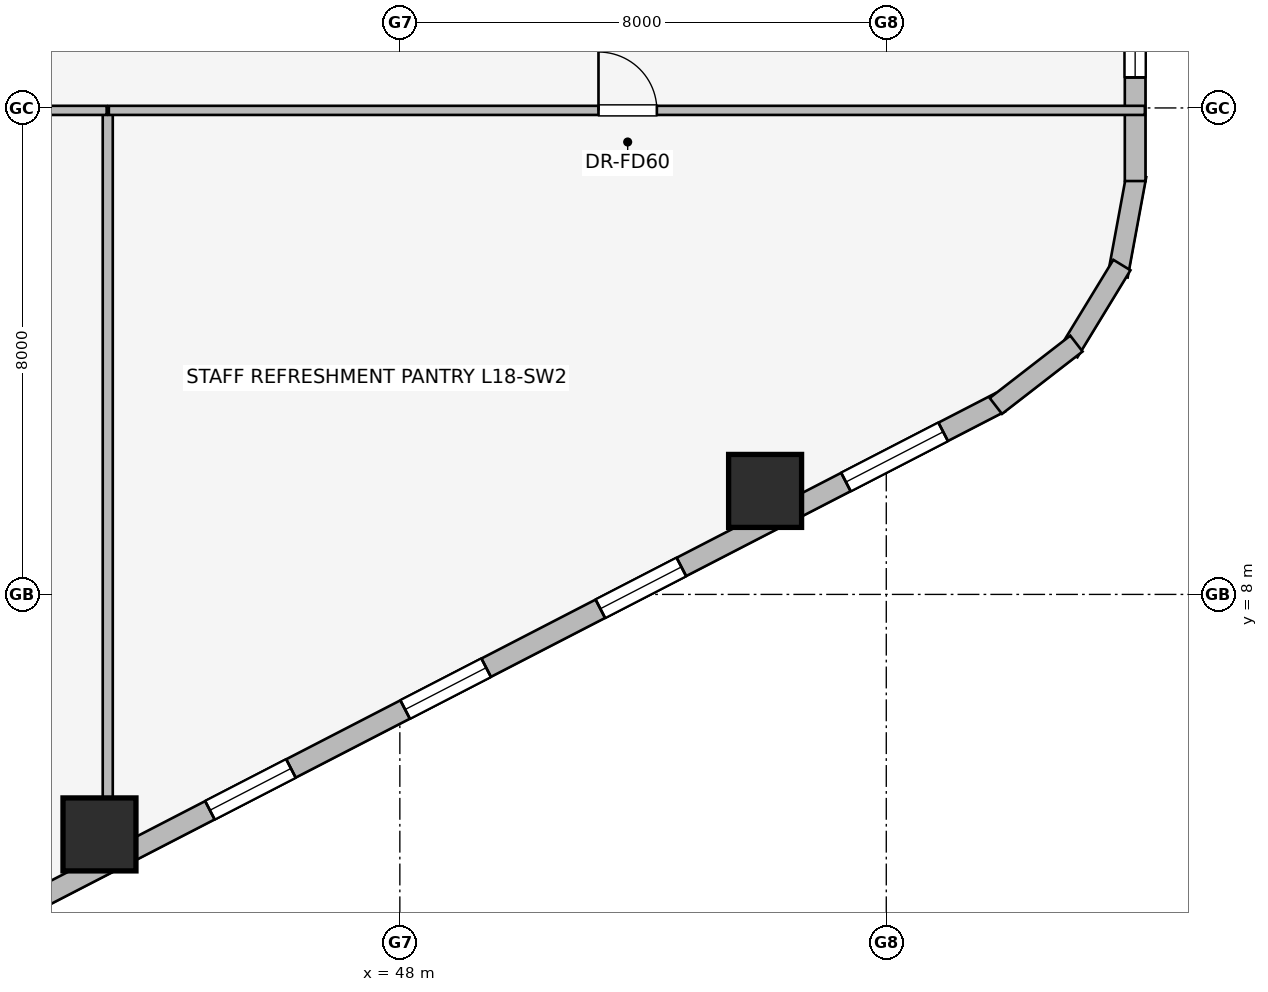
"""IFC4 building model, lengths in metres.
Left out: names, types, materials, properties, quantities, classifications, styles, units other than length and angle.
Written with IfcOpenShell. Run it as: python <this file> out.ifc"""

import sys

from ifc_helpers import new_model, si_unit, direction, frame, frame_2d, origin, origin_2d, place, context, subcontext, project, spatial, rectangle, extrude, element, fill, save


model = new_model("IFC4")
c1 = context("Model", 3, precision=1e-05, world=origin(), true_north=direction((0.0, 1.0)))
c2 = subcontext(c1, "Body", "Model", "MODEL_VIEW")
j1 = project(units=[si_unit("LENGTHUNIT", "METRE"), si_unit("PLANEANGLEUNIT", "RADIAN")], contexts=[c1])
p1 = place(None, origin())
s1 = spatial("IfcSite", under=j1, at=p1, CompositionType="ELEMENT")
p2 = place(p1, origin())
s2 = spatial("IfcBuilding", under=s1, at=p2, CompositionType="ELEMENT")
p3 = place(p2, frame((0.0, 0.0, 70.8)))
s3 = spatial("IfcBuildingStorey", under=s2, at=p3, CompositionType="ELEMENT", Elevation=70.8)
for number, where, z_axis, x_axis in (
    (1, (43.06, 4.053, 0.0), (0.0, 0.0, 1.0), (1.0, 0.0, 0.0)),
    (2, (54.007, 9.702, 0.0), (0.0, 0.0, 1.0), (1.0, 0.0, 0.0)),
):
    element("IfcColumn", number, at=place(p3, frame(where, z_axis=z_axis, x_axis=x_axis)), inside=s3, PredefinedType="COLUMN", context=c2, shape_type="SweptSolid", body=[
        extrude(rectangle(XDim=1.2, YDim=1.2, at=origin_2d()), origin(), (0.0, 0.0, 1.0), 3.65),
    ])
p4 = place(p3, frame((57.876, 11.159, 0.0), z_axis=(0.0, 0.0, 1.0), x_axis=(-0.888634413993, -0.458616264721, 0.0)))
e3 = element("IfcWall", 3, at=p4, inside=s3, PredefinedType="STANDARD", context=c2, shape_type="SweptSolid", body=[
    extrude(rectangle(XDim=20.531, YDim=0.34, at=frame_2d((10.266, 0.0))), origin(), (0.0, 0.0, 1.0), 2.684),
])
p5 = place(p4, frame((1.058, 0.0, 0.75)))
e4 = element("IfcOpeningElement", 4, at=p5, cuts=e3, PredefinedType="OPENING", context=c2, shape_type="SweptSolid", body=[
    extrude(rectangle(XDim=1.8, YDim=1.5, at=frame_2d((0.9, 0.75))), frame((0.0, 0.18, 0.0), z_axis=(0.0, -1.0, 0.0), x_axis=(1.0, 0.0, 0.0)), (0.0, 0.0, 1.0), 0.36),
])
p6 = place(p4, frame((5.903, 0.0, 0.75)))
e5 = element("IfcOpeningElement", 5, at=p6, cuts=e3, PredefinedType="OPENING", context=c2, shape_type="SweptSolid", body=[
    extrude(rectangle(XDim=1.5, YDim=1.5, at=frame_2d((0.75, 0.75))), frame((0.0, 0.18, 0.0), z_axis=(0.0, -1.0, 0.0), x_axis=(1.0, 0.0, 0.0)), (0.0, 0.0, 1.0), 0.36),
])
p7 = place(p4, frame((9.516, 0.0, 0.75)))
e6 = element("IfcOpeningElement", 6, at=p7, cuts=e3, PredefinedType="OPENING", context=c2, shape_type="SweptSolid", body=[
    extrude(rectangle(XDim=1.5, YDim=1.5, at=frame_2d((0.75, 0.75))), frame((0.0, 0.18, 0.0), z_axis=(0.0, -1.0, 0.0), x_axis=(1.0, 0.0, 0.0)), (0.0, 0.0, 1.0), 0.36),
])
p8 = place(p4, frame((13.129, 0.0, 0.75)))
e7 = element("IfcOpeningElement", 7, at=p8, cuts=e3, PredefinedType="OPENING", context=c2, shape_type="SweptSolid", body=[
    extrude(rectangle(XDim=1.5, YDim=1.5, at=frame_2d((0.75, 0.75))), frame((0.0, 0.18, 0.0), z_axis=(0.0, -1.0, 0.0), x_axis=(1.0, 0.0, 0.0)), (0.0, 0.0, 1.0), 0.36),
])
p9 = place(p4, frame((17.673, 0.0, 0.75)))
e8 = element("IfcOpeningElement", 8, at=p9, cuts=e3, PredefinedType="OPENING", context=c2, shape_type="SweptSolid", body=[
    extrude(rectangle(XDim=1.8, YDim=1.5, at=frame_2d((0.9, 0.75))), frame((0.0, 0.18, 0.0), z_axis=(0.0, -1.0, 0.0), x_axis=(1.0, 0.0, 0.0)), (0.0, 0.0, 1.0), 0.36),
])
p10 = place(p3, frame((60.113, 14.892, 0.0), z_axis=(0.0, 0.0, 1.0), x_axis=(-0.181714143354, -0.983351397063, 0.0)))
e9 = element("IfcWall", 9, at=p10, inside=s3, PredefinedType="STANDARD", context=c2, shape_type="SweptSolid", body=[
    extrude(rectangle(XDim=1.678, YDim=0.33, at=frame_2d((0.839, 0.0))), origin(), (0.0, 0.0, 1.0), 3.39),
])
p11 = place(p3, frame((59.875, 13.417, 0.0), z_axis=(0.0, 0.0, 1.0), x_axis=(-0.520584129191, -0.853810379671, 0.0)))
e10 = element("IfcWall", 10, at=p11, inside=s3, PredefinedType="STANDARD", context=c2, shape_type="SweptSolid", body=[
    extrude(rectangle(XDim=1.677, YDim=0.33, at=frame_2d((0.838, 0.0))), origin(), (0.0, 0.0, 1.0), 3.39),
])
p12 = place(p3, frame((59.127, 12.125, 0.0), z_axis=(0.0, 0.0, 1.0), x_axis=(-0.790691856293, -0.61221433207, 0.0)))
e11 = element("IfcWall", 11, at=p12, inside=s3, PredefinedType="STANDARD", context=c2, shape_type="SweptSolid", body=[
    extrude(rectangle(XDim=1.676, YDim=0.33, at=frame_2d((0.838, 0.0))), origin(), (0.0, 0.0, 1.0), 3.39),
])
p13 = place(p3, frame((60.093, 33.202, 0.0), z_axis=(0.0, 0.0, 1.0), x_axis=(0.0, -1.0, 0.0)))
e12 = element("IfcWall", 12, at=p13, inside=s3, PredefinedType="STANDARD", context=c2, shape_type="SweptSolid", body=[
    extrude(rectangle(XDim=18.404, YDim=0.34, at=frame_2d((9.202, 0.0))), origin(), (0.0, 0.0, 1.0), 2.684),
])
p14 = place(p13, frame((8.652, 0.0, 0.0)))
e13 = element("IfcOpeningElement", 13, at=p14, cuts=e12, PredefinedType="OPENING", context=c2, shape_type="SweptSolid", body=[
    extrude(rectangle(XDim=1.1, YDim=2.04, at=frame_2d((0.55, 1.02))), frame((0.0, 0.18, 0.0), z_axis=(0.0, -1.0, 0.0), x_axis=(1.0, 0.0, 0.0)), (0.0, 0.0, 1.0), 0.36),
])
p15 = place(p13, frame((1.744, 0.0, 0.75)))
e14 = element("IfcOpeningElement", 14, at=p15, cuts=e12, PredefinedType="OPENING", context=c2, shape_type="SweptSolid", body=[
    extrude(rectangle(XDim=1.05, YDim=1.4, at=frame_2d((0.525, 0.7))), frame((0.0, 0.18, 0.0), z_axis=(0.0, -1.0, 0.0), x_axis=(1.0, 0.0, 0.0)), (0.0, 0.0, 1.0), 0.36),
])
p16 = place(p13, frame((4.891, 0.0, 0.75)))
e15 = element("IfcOpeningElement", 15, at=p16, cuts=e12, PredefinedType="OPENING", context=c2, shape_type="SweptSolid", body=[
    extrude(rectangle(XDim=1.5, YDim=1.5, at=frame_2d((0.75, 0.75))), frame((0.0, 0.18, 0.0), z_axis=(0.0, -1.0, 0.0), x_axis=(1.0, 0.0, 0.0)), (0.0, 0.0, 1.0), 0.36),
])
p17 = place(p13, frame((11.863, 0.0, 0.75)))
e16 = element("IfcOpeningElement", 16, at=p17, cuts=e12, PredefinedType="OPENING", context=c2, shape_type="SweptSolid", body=[
    extrude(rectangle(XDim=1.8, YDim=1.5, at=frame_2d((0.9, 0.75))), frame((0.0, 0.18, 0.0), z_axis=(0.0, -1.0, 0.0), x_axis=(1.0, 0.0, 0.0)), (0.0, 0.0, 1.0), 0.36),
])
p18 = place(p13, frame((15.65, 0.0, 0.75)))
e17 = element("IfcOpeningElement", 17, at=p18, cuts=e12, PredefinedType="OPENING", context=c2, shape_type="SweptSolid", body=[
    extrude(rectangle(XDim=1.05, YDim=1.4, at=frame_2d((0.525, 0.7))), frame((0.0, 0.18, 0.0), z_axis=(0.0, -1.0, 0.0), x_axis=(1.0, 0.0, 0.0)), (0.0, 0.0, 1.0), 0.36),
])
p19 = place(p3, frame((43.196, 3.718, 0.0), z_axis=(0.0, 0.0, 1.0), x_axis=(0.0, 1.0, 0.0)))
e18 = element("IfcWall", 18, at=p19, inside=s3, PredefinedType="PARTITIONING", context=c2, shape_type="SweptSolid", body=[
    extrude(rectangle(XDim=12.212, YDim=0.165, at=frame_2d((6.106, 0.0))), origin(), (0.0, 0.0, 1.0), 2.513),
])
p20 = place(p3, frame((32.85, 15.96, 0.0), z_axis=(0.0, 0.0, 1.0), x_axis=(1.0, 0.0, 0.0)))
e19 = element("IfcWall", 19, at=p20, inside=s3, PredefinedType="PARTITIONING", context=c2, shape_type="SweptSolid", body=[
    extrude(rectangle(XDim=10.328, YDim=0.15, at=frame_2d((5.164, 0.0))), origin(), (0.0, 0.0, 1.0), 3.39),
])
p21 = place(p20, frame((4.684, 0.0, 0.0)))
e20 = element("IfcOpeningElement", 20, at=p21, cuts=e19, PredefinedType="OPENING", context=c2, shape_type="SweptSolid", body=[
    extrude(rectangle(XDim=0.96, YDim=2.0, at=frame_2d((0.48, 1.0))), frame((0.0, 0.085, 0.0), z_axis=(0.0, -1.0, 0.0), x_axis=(1.0, 0.0, 0.0)), (0.0, 0.0, 1.0), 0.17),
])
p22 = place(p3, frame((43.214, 15.96, 0.0), z_axis=(0.0, 0.0, 1.0), x_axis=(1.0, 0.0, 0.0)))
e21 = element("IfcWall", 21, at=p22, inside=s3, PredefinedType="PARTITIONING", context=c2, shape_type="SweptSolid", body=[
    extrude(rectangle(XDim=17.039, YDim=0.15, at=frame_2d((8.52, 0.0))), origin(), (0.0, 0.0, 1.0), 3.39),
])
p23 = place(p22, frame((8.053, 0.0, 0.0)))
e22 = element("IfcOpeningElement", 22, at=p23, cuts=e21, PredefinedType="OPENING", context=c2, shape_type="SweptSolid", body=[
    extrude(rectangle(XDim=0.96, YDim=2.0, at=frame_2d((0.48, 1.0))), frame((0.0, 0.085, 0.0), z_axis=(0.0, -1.0, 0.0), x_axis=(1.0, 0.0, 0.0)), (0.0, 0.0, 1.0), 0.17),
])
p24 = place(p5, origin())
e23 = element("IfcWindow", 23, at=p24, inside=s3, PartitioningType="SINGLE_PANEL", PredefinedType="WINDOW", context=c2, shape_type="SweptSolid", body=[
    extrude(rectangle(XDim=1.8, YDim=1.5, at=frame_2d((0.9, 0.75))), frame((0.0, 0.03, 0.0), z_axis=(0.0, -1.0, 0.0), x_axis=(1.0, 0.0, 0.0)), (0.0, 0.0, 1.0), 0.06),
])
fill(e4, e23)
p25 = place(p6, origin())
e24 = element("IfcWindow", 24, at=p25, inside=s3, PartitioningType="SINGLE_PANEL", PredefinedType="WINDOW", context=c2, shape_type="SweptSolid", body=[
    extrude(rectangle(XDim=1.5, YDim=1.5, at=frame_2d((0.75, 0.75))), frame((0.0, 0.03, 0.0), z_axis=(0.0, -1.0, 0.0), x_axis=(1.0, 0.0, 0.0)), (0.0, 0.0, 1.0), 0.06),
])
fill(e5, e24)
p26 = place(p7, origin())
e25 = element("IfcWindow", 25, at=p26, inside=s3, PartitioningType="SINGLE_PANEL", PredefinedType="WINDOW", context=c2, shape_type="SweptSolid", body=[
    extrude(rectangle(XDim=1.5, YDim=1.5, at=frame_2d((0.75, 0.75))), frame((0.0, 0.03, 0.0), z_axis=(0.0, -1.0, 0.0), x_axis=(1.0, 0.0, 0.0)), (0.0, 0.0, 1.0), 0.06),
])
fill(e6, e25)
p27 = place(p8, origin())
e26 = element("IfcWindow", 26, at=p27, inside=s3, PartitioningType="SINGLE_PANEL", PredefinedType="WINDOW", context=c2, shape_type="SweptSolid", body=[
    extrude(rectangle(XDim=1.5, YDim=1.5, at=frame_2d((0.75, 0.75))), frame((0.0, 0.03, 0.0), z_axis=(0.0, -1.0, 0.0), x_axis=(1.0, 0.0, 0.0)), (0.0, 0.0, 1.0), 0.06),
])
fill(e7, e26)
p28 = place(p18, origin())
e27 = element("IfcWindow", 27, at=p28, inside=s3, PartitioningType="SINGLE_PANEL", PredefinedType="WINDOW", context=c2, shape_type="SweptSolid", body=[
    extrude(rectangle(XDim=1.05, YDim=1.4, at=frame_2d((0.525, 0.7))), frame((0.0, 0.03, 0.0), z_axis=(0.0, -1.0, 0.0), x_axis=(1.0, 0.0, 0.0)), (0.0, 0.0, 1.0), 0.06),
])
fill(e17, e27)
p29 = place(p23, origin())
e28 = element("IfcDoor", 28, at=p29, inside=s3, OperationType="SINGLE_SWING_LEFT", PredefinedType="DOOR", context=c2, shape_type="SweptSolid", body=[
    extrude(rectangle(XDim=0.96, YDim=2.0, at=frame_2d((0.48, 1.0))), frame((0.0, 0.025, 0.0), z_axis=(0.0, -1.0, 0.0), x_axis=(1.0, 0.0, 0.0)), (0.0, 0.0, 1.0), 0.05),
])
fill(e22, e28)
save(model, sys.argv[1])
